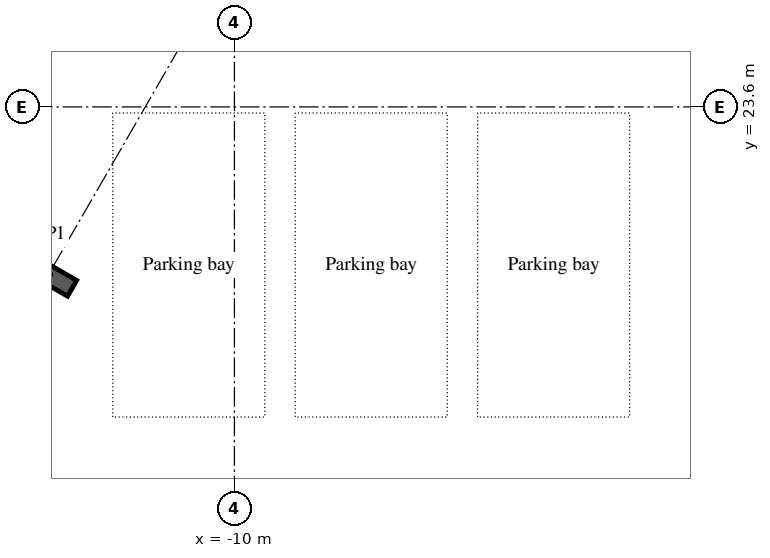
"""IFC4 building model, lengths in metres.
Left out: names, types, materials, properties, quantities, classifications, styles, units other than length and angle.
Written with IfcOpenShell. Run it as: python <this file> out.ifc"""

import sys

from ifc_helpers import new_model, si_unit, direction, frame, origin, origin_2d, place, context, subcontext, project, spatial, i_section, extrude, element, save


model = new_model("IFC4")
c1 = context("Model", 3, precision=1e-05, world=origin(), true_north=direction((0.0, 1.0)))
c2 = subcontext(c1, "Body", "Model", "MODEL_VIEW")
j1 = project(units=[si_unit("LENGTHUNIT", "METRE"), si_unit("PLANEANGLEUNIT", "RADIAN")], contexts=[c1])
p1 = place(None, origin())
s1 = spatial("IfcSite", under=j1, at=p1, CompositionType="ELEMENT")
p2 = place(p1, origin())
s2 = spatial("IfcBuilding", under=s1, at=p2, CompositionType="ELEMENT")
p3 = place(p2, frame((0.0, 0.0, -4.2)))
s3 = spatial("IfcBuildingStorey", under=s2, at=p3, CompositionType="ELEMENT", Elevation=-4.2)
p4 = place(p3, frame((-13.059, 20.842, -0.38), z_axis=(0.0, 0.0, 1.0), x_axis=(0.50000017485, 0.866025302835, 0.0)))
e1 = element("IfcColumn", 1, at=p4, inside=s3, PredefinedType="COLUMN", context=c2, shape_type="SweptSolid", body=[
    extrude(i_section(OverallWidth=0.3, OverallDepth=0.9, WebThickness=0.019, FlangeThickness=0.035, FilletRadius=0.03, at=origin_2d()), origin(), (0.0, 0.0, 1.0), 4.16),
])
save(model, sys.argv[1])
